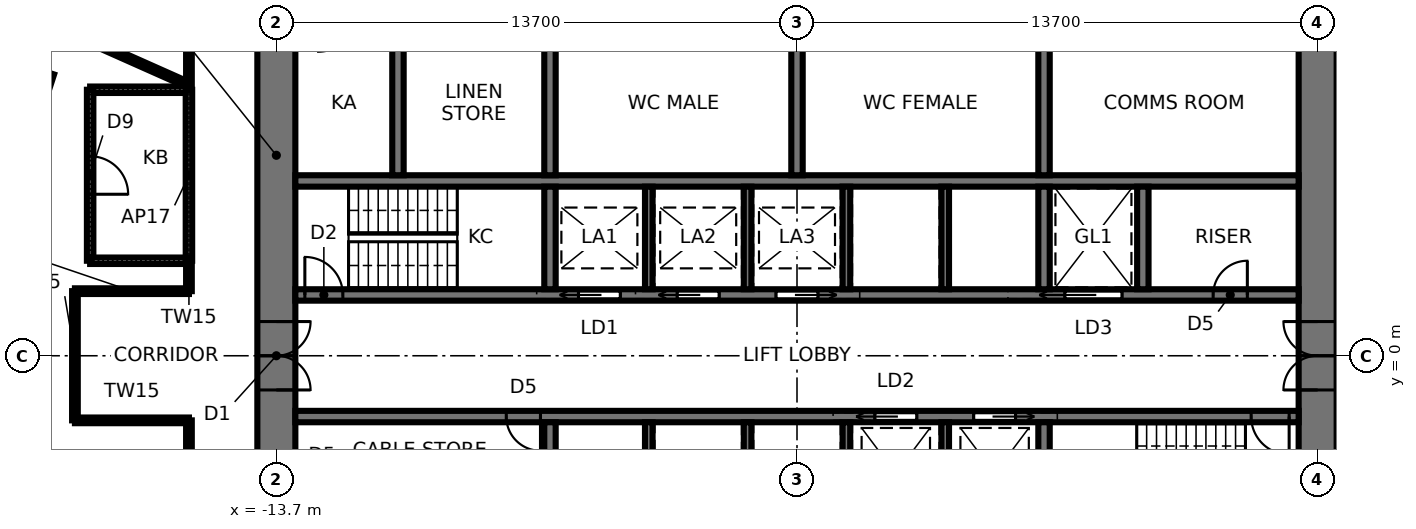
"""IFC4 building model, lengths in metres.
Left out: names, types, materials, properties, quantities, classifications, styles, units other than length and angle.
Written with IfcOpenShell. Run it as: python <this file> out.ifc"""

import sys

from ifc_helpers import new_model, si_unit, direction, frame, frame_2d, origin, origin_2d, place, context, subcontext, project, spatial, rectangle, extrude, element, fill, save


model = new_model("IFC4")
c1 = context("Model", 3, precision=1e-05, world=origin(), true_north=direction((0.0, 1.0)))
c2 = subcontext(c1, "Body", "Model", "MODEL_VIEW")
j1 = project(units=[si_unit("LENGTHUNIT", "METRE"), si_unit("PLANEANGLEUNIT", "RADIAN")], contexts=[c1])
p1 = place(None, origin())
s1 = spatial("IfcSite", under=j1, at=p1, CompositionType="ELEMENT")
p2 = place(p1, origin())
s2 = spatial("IfcBuilding", under=s1, at=p2, CompositionType="ELEMENT")
p3 = place(p2, frame((0.0, 0.0, 32.2)))
s3 = spatial("IfcBuildingStorey", under=s2, at=p3, CompositionType="ELEMENT", Elevation=32.2)
p4 = place(p3, frame((-20.808, 6.761, 0.0), z_axis=(0.0, 0.0, 1.0), x_axis=(-0.951056516295, 0.309016994375, 0.0)))
e1 = element("IfcColumn", 1, at=p4, inside=s3, PredefinedType="COLUMN", context=c2, shape_type="SweptSolid", body=[
    extrude(rectangle(XDim=2.0, YDim=2.0, at=origin_2d()), origin(), (0.0, 0.0, 1.0), 4.2),
])
p5 = place(p3, frame((13.7, -9.5, 0.0), z_axis=(0.0, 0.0, 1.0), x_axis=(0.0, 1.0, 0.0)))
e2 = element("IfcWall", 2, at=p5, inside=s3, PredefinedType="SHEAR", context=c2, shape_type="SweptSolid", body=[
    extrude(rectangle(XDim=19.0, YDim=1.0, at=frame_2d((9.5, 0.0))), origin(), (0.0, 0.0, 1.0), 4.2),
])
p6 = place(p5, frame((8.6, 0.0, 0.0)))
e3 = element("IfcOpeningElement", 3, at=p6, cuts=e2, PredefinedType="OPENING", context=c2, shape_type="SweptSolid", body=[
    extrude(rectangle(XDim=1.8, YDim=2.4, at=frame_2d((0.9, 1.2))), frame((0.0, 0.51, 0.0), z_axis=(0.0, -1.0, 0.0), x_axis=(1.0, 0.0, 0.0)), (0.0, 0.0, 1.0), 1.02),
])
p7 = place(p3, frame((-13.7, 9.5, 0.0), z_axis=(0.0, 0.0, 1.0), x_axis=(0.0, -1.0, 0.0)))
e4 = element("IfcWall", 4, at=p7, inside=s3, PredefinedType="SHEAR", context=c2, shape_type="SweptSolid", body=[
    extrude(rectangle(XDim=19.0, YDim=1.0, at=frame_2d((9.5, 0.0))), origin(), (0.0, 0.0, 1.0), 4.2),
])
p8 = place(p7, frame((8.6, 0.0, 0.0)))
e5 = element("IfcOpeningElement", 5, at=p8, cuts=e4, PredefinedType="OPENING", context=c2, shape_type="SweptSolid", body=[
    extrude(rectangle(XDim=1.8, YDim=2.4, at=frame_2d((0.9, 1.2))), frame((0.0, 0.51, 0.0), z_axis=(0.0, -1.0, 0.0), x_axis=(1.0, 0.0, 0.0)), (0.0, 0.0, 1.0), 1.02),
])
p9 = place(p3, frame((-13.2, 1.6, 0.0), z_axis=(0.0, 0.0, 1.0), x_axis=(1.0, 0.0, 0.0)))
e6 = element("IfcWall", 6, at=p9, inside=s3, PredefinedType="SHEAR", context=c2, shape_type="SweptSolid", body=[
    extrude(rectangle(XDim=26.4, YDim=0.3, at=frame_2d((13.2, 0.0))), origin(), (0.0, 0.0, 1.0), 4.2),
])
p10 = place(p9, frame((0.25, 0.0, 0.0)))
e7 = element("IfcOpeningElement", 7, at=p10, cuts=e6, PredefinedType="OPENING", context=c2, shape_type="SweptSolid", body=[
    extrude(rectangle(XDim=1.0, YDim=2.1, at=frame_2d((0.5, 1.05))), frame((0.0, 0.16, 0.0), z_axis=(0.0, -1.0, 0.0), x_axis=(1.0, 0.0, 0.0)), (0.0, 0.0, 1.0), 0.32),
])
p11 = place(p9, frame((20.25, 0.0, 0.0)))
e8 = element("IfcOpeningElement", 8, at=p11, cuts=e6, PredefinedType="OPENING", context=c2, shape_type="SweptSolid", body=[
    extrude(rectangle(XDim=1.5, YDim=2.4, at=frame_2d((0.75, 1.2))), frame((0.0, 0.16, 0.0), z_axis=(0.0, -1.0, 0.0), x_axis=(1.0, 0.0, 0.0)), (0.0, 0.0, 1.0), 0.32),
])
p12 = place(p9, frame((7.45, 0.0, 0.0)))
e9 = element("IfcOpeningElement", 9, at=p12, cuts=e6, PredefinedType="OPENING", context=c2, shape_type="SweptSolid", body=[
    extrude(rectangle(XDim=1.1, YDim=2.3, at=frame_2d((0.55, 1.15))), frame((0.0, 0.16, 0.0), z_axis=(0.0, -1.0, 0.0), x_axis=(1.0, 0.0, 0.0)), (0.0, 0.0, 1.0), 0.32),
])
p13 = place(p9, frame((10.05, 0.0, 0.0)))
e10 = element("IfcOpeningElement", 10, at=p13, cuts=e6, PredefinedType="OPENING", context=c2, shape_type="SweptSolid", body=[
    extrude(rectangle(XDim=1.1, YDim=2.3, at=frame_2d((0.55, 1.15))), frame((0.0, 0.16, 0.0), z_axis=(0.0, -1.0, 0.0), x_axis=(1.0, 0.0, 0.0)), (0.0, 0.0, 1.0), 0.32),
])
p14 = place(p9, frame((12.65, 0.0, 0.0)))
e11 = element("IfcOpeningElement", 11, at=p14, cuts=e6, PredefinedType="OPENING", context=c2, shape_type="SweptSolid", body=[
    extrude(rectangle(XDim=1.1, YDim=2.3, at=frame_2d((0.55, 1.15))), frame((0.0, 0.16, 0.0), z_axis=(0.0, -1.0, 0.0), x_axis=(1.0, 0.0, 0.0)), (0.0, 0.0, 1.0), 0.32),
])
p15 = place(p9, frame((24.15, 0.0, 0.0)))
e12 = element("IfcOpeningElement", 12, at=p15, cuts=e6, PredefinedType="OPENING", context=c2, shape_type="SweptSolid", body=[
    extrude(rectangle(XDim=0.9, YDim=2.1, at=frame_2d((0.45, 1.05))), frame((0.0, 0.16, 0.0), z_axis=(0.0, -1.0, 0.0), x_axis=(1.0, 0.0, 0.0)), (0.0, 0.0, 1.0), 0.32),
])
p16 = place(p3, frame((-13.2, -1.6, 0.0), z_axis=(0.0, 0.0, 1.0), x_axis=(1.0, 0.0, 0.0)))
e13 = element("IfcWall", 13, at=p16, inside=s3, PredefinedType="SHEAR", context=c2, shape_type="SweptSolid", body=[
    extrude(rectangle(XDim=26.4, YDim=0.3, at=frame_2d((13.2, 0.0))), origin(), (0.0, 0.0, 1.0), 4.2),
])
p17 = place(p16, frame((25.15, 0.0, 0.0)))
e14 = element("IfcOpeningElement", 14, at=p17, cuts=e13, PredefinedType="OPENING", context=c2, shape_type="SweptSolid", body=[
    extrude(rectangle(XDim=1.0, YDim=2.1, at=frame_2d((0.5, 1.05))), frame((0.0, 0.16, 0.0), z_axis=(0.0, -1.0, 0.0), x_axis=(1.0, 0.0, 0.0)), (0.0, 0.0, 1.0), 0.32),
])
p18 = place(p16, frame((15.25, 0.0, 0.0)))
e15 = element("IfcOpeningElement", 15, at=p18, cuts=e13, PredefinedType="OPENING", context=c2, shape_type="SweptSolid", body=[
    extrude(rectangle(XDim=1.1, YDim=2.3, at=frame_2d((0.55, 1.15))), frame((0.0, 0.16, 0.0), z_axis=(0.0, -1.0, 0.0), x_axis=(1.0, 0.0, 0.0)), (0.0, 0.0, 1.0), 0.32),
])
p19 = place(p16, frame((17.85, 0.0, 0.0)))
e16 = element("IfcOpeningElement", 16, at=p19, cuts=e13, PredefinedType="OPENING", context=c2, shape_type="SweptSolid", body=[
    extrude(rectangle(XDim=1.1, YDim=2.3, at=frame_2d((0.55, 1.15))), frame((0.0, 0.16, 0.0), z_axis=(0.0, -1.0, 0.0), x_axis=(1.0, 0.0, 0.0)), (0.0, 0.0, 1.0), 0.32),
])
p20 = place(p16, frame((5.55, 0.0, 0.0)))
e17 = element("IfcOpeningElement", 17, at=p20, cuts=e13, PredefinedType="OPENING", context=c2, shape_type="SweptSolid", body=[
    extrude(rectangle(XDim=0.9, YDim=2.1, at=frame_2d((0.45, 1.05))), frame((0.0, 0.16, 0.0), z_axis=(0.0, -1.0, 0.0), x_axis=(1.0, 0.0, 0.0)), (0.0, 0.0, 1.0), 0.32),
])
p21 = place(p3, frame((-13.2, 4.6, 0.0), z_axis=(0.0, 0.0, 1.0), x_axis=(1.0, 0.0, 0.0)))
e18 = element("IfcWall", 18, at=p21, inside=s3, PredefinedType="SHEAR", context=c2, shape_type="SweptSolid", body=[
    extrude(rectangle(XDim=26.4, YDim=0.3, at=frame_2d((13.2, 0.0))), origin(), (0.0, 0.0, 1.0), 4.2),
])
p22 = place(p3, frame((-6.5, 1.75, 0.0), z_axis=(0.0, 0.0, 1.0), x_axis=(0.0, 1.0, 0.0)))
e19 = element("IfcWall", 19, at=p22, inside=s3, PredefinedType="SHEAR", context=c2, shape_type="SweptSolid", body=[
    extrude(rectangle(XDim=2.7, YDim=0.3, at=frame_2d((1.35, 0.0))), origin(), (0.0, 0.0, 1.0), 4.2),
])
p23 = place(p3, frame((-6.5, 4.75, 0.0), z_axis=(0.0, 0.0, 1.0), x_axis=(0.0, 1.0, 0.0)))
e20 = element("IfcWall", 20, at=p23, inside=s3, PredefinedType="SHEAR", context=c2, shape_type="SweptSolid", body=[
    extrude(rectangle(XDim=3.75, YDim=0.3, at=frame_2d((1.875, 0.0))), origin(), (0.0, 0.0, 1.0), 4.2),
])
p24 = place(p3, frame((6.5, 1.75, 0.0), z_axis=(0.0, 0.0, 1.0), x_axis=(0.0, 1.0, 0.0)))
e21 = element("IfcWall", 21, at=p24, inside=s3, PredefinedType="SHEAR", context=c2, shape_type="SweptSolid", body=[
    extrude(rectangle(XDim=2.7, YDim=0.3, at=frame_2d((1.35, 0.0))), origin(), (0.0, 0.0, 1.0), 4.2),
])
p25 = place(p3, frame((6.5, 4.75, 0.0), z_axis=(0.0, 0.0, 1.0), x_axis=(0.0, 1.0, 0.0)))
e22 = element("IfcWall", 22, at=p25, inside=s3, PredefinedType="SHEAR", context=c2, shape_type="SweptSolid", body=[
    extrude(rectangle(XDim=3.75, YDim=0.3, at=frame_2d((1.875, 0.0))), origin(), (0.0, 0.0, 1.0), 4.2),
])
for number, where, z_axis, x_axis in (
    (23, (-3.9, 1.75, 0.0), (0.0, 0.0, 1.0), (0.0, 1.0, 0.0)),
    (24, (-1.3, 1.75, 0.0), (0.0, 0.0, 1.0), (0.0, 1.0, 0.0)),
    (25, (1.3, 1.75, 0.0), (0.0, 0.0, 1.0), (0.0, 1.0, 0.0)),
    (26, (3.9, 1.75, 0.0), (0.0, 0.0, 1.0), (0.0, 1.0, 0.0)),
):
    element("IfcWall", number, at=place(p3, frame(where, z_axis=z_axis, x_axis=x_axis)), inside=s3, PredefinedType="SHEAR", context=c2, shape_type="SweptSolid", body=[
        extrude(rectangle(XDim=2.7, YDim=0.2, at=frame_2d((1.35, 0.0))), origin(), (0.0, 0.0, 1.0), 4.2),
    ])
p26 = place(p3, frame((0.0, 4.75, 0.0), z_axis=(0.0, 0.0, 1.0), x_axis=(0.0, 1.0, 0.0)))
e27 = element("IfcWall", 27, at=p26, inside=s3, PredefinedType="SHEAR", context=c2, shape_type="SweptSolid", body=[
    extrude(rectangle(XDim=3.75, YDim=0.3, at=frame_2d((1.875, 0.0))), origin(), (0.0, 0.0, 1.0), 4.2),
])
for number, where, z_axis, x_axis in (
    (28, (-6.5, -1.75, 0.0), (0.0, 0.0, 1.0), (0.0, -1.0, 0.0)),
    (29, (6.5, -1.75, 0.0), (0.0, 0.0, 1.0), (0.0, -1.0, 0.0)),
):
    element("IfcWall", number, at=place(p3, frame(where, z_axis=z_axis, x_axis=x_axis)), inside=s3, PredefinedType="SHEAR", context=c2, shape_type="SweptSolid", body=[
        extrude(rectangle(XDim=2.7, YDim=0.3, at=frame_2d((1.35, 0.0))), origin(), (0.0, 0.0, 1.0), 4.2),
    ])
for number, where, z_axis, x_axis in (
    (30, (-3.9, -1.75, 0.0), (0.0, 0.0, 1.0), (0.0, -1.0, 0.0)),
    (31, (-1.3, -1.75, 0.0), (0.0, 0.0, 1.0), (0.0, -1.0, 0.0)),
    (32, (1.3, -1.75, 0.0), (0.0, 0.0, 1.0), (0.0, -1.0, 0.0)),
    (33, (3.9, -1.75, 0.0), (0.0, 0.0, 1.0), (0.0, -1.0, 0.0)),
):
    element("IfcWall", number, at=place(p3, frame(where, z_axis=z_axis, x_axis=x_axis)), inside=s3, PredefinedType="SHEAR", context=c2, shape_type="SweptSolid", body=[
        extrude(rectangle(XDim=2.7, YDim=0.2, at=frame_2d((1.35, 0.0))), origin(), (0.0, 0.0, 1.0), 4.2),
    ])
p27 = place(p3, frame((-10.5, 4.75, 0.0), z_axis=(0.0, 0.0, 1.0), x_axis=(0.0, 1.0, 0.0)))
e34 = element("IfcWall", 34, at=p27, inside=s3, PredefinedType="SHEAR", context=c2, shape_type="SweptSolid", body=[
    extrude(rectangle(XDim=3.75, YDim=0.3, at=frame_2d((1.875, 0.0))), origin(), (0.0, 0.0, 1.0), 4.2),
])
p28 = place(p3, frame((9.1, 1.75, 0.0), z_axis=(0.0, 0.0, 1.0), x_axis=(0.0, 1.0, 0.0)))
e35 = element("IfcWall", 35, at=p28, inside=s3, PredefinedType="SHEAR", context=c2, shape_type="SweptSolid", body=[
    extrude(rectangle(XDim=2.7, YDim=0.3, at=frame_2d((1.35, 0.0))), origin(), (0.0, 0.0, 1.0), 4.2),
])
p29 = place(p3, frame((-19.0, -1.7, 0.0), z_axis=(0.0, 0.0, 1.0), x_axis=(1.0, 0.0, 0.0)))
e36 = element("IfcWall", 36, at=p29, inside=s3, PredefinedType="PARTITIONING", context=c2, shape_type="SweptSolid", body=[
    extrude(rectangle(XDim=3.0, YDim=0.15, at=frame_2d((1.5, 0.0))), origin(), (0.0, 0.0, 1.0), 4.04),
])
p30 = place(p3, frame((-16.0, -1.7, 0.0), z_axis=(0.0, 0.0, 1.0), x_axis=(0.0, -1.0, 0.0)))
e37 = element("IfcWall", 37, at=p30, inside=s3, PredefinedType="PARTITIONING", context=c2, shape_type="SweptSolid", body=[
    extrude(rectangle(XDim=9.6, YDim=0.15, at=frame_2d((4.8, 0.0))), origin(), (0.0, 0.0, 1.0), 4.04),
])
p31 = place(p30, frame((3.8, 0.0, 0.0)))
e38 = element("IfcOpeningElement", 38, at=p31, cuts=e37, PredefinedType="OPENING", context=c2, shape_type="SweptSolid", body=[
    extrude(rectangle(XDim=2.0, YDim=2.4, at=frame_2d((1.0, 1.2))), frame((0.0, 0.085, 0.0), z_axis=(0.0, -1.0, 0.0), x_axis=(1.0, 0.0, 0.0)), (0.0, 0.0, 1.0), 0.17),
])
p32 = place(p3, frame((-16.0, 11.3, 0.0), z_axis=(0.0, 0.0, 1.0), x_axis=(0.0, -1.0, 0.0)))
e39 = element("IfcWall", 39, at=p32, inside=s3, PredefinedType="PARTITIONING", context=c2, shape_type="SweptSolid", body=[
    extrude(rectangle(XDim=4.3, YDim=0.15, at=frame_2d((2.15, 0.0))), origin(), (0.0, 0.0, 1.0), 4.04),
])
p33 = place(p3, frame((-16.0, 7.124, 0.0), z_axis=(0.0, 0.0, 1.0), x_axis=(-0.913550959064, 0.406724286457, 0.0)))
e40 = element("IfcWall", 40, at=p33, inside=s3, PredefinedType="PARTITIONING", context=c2, shape_type="SweptSolid", body=[
    extrude(rectangle(XDim=8.892, YDim=0.15, at=frame_2d((4.446, 0.0))), origin(), (0.0, 0.0, 1.0), 4.04),
])
p34 = place(p3, frame((-16.0, 7.0, 0.0), z_axis=(0.0, 0.0, 1.0), x_axis=(-1.0, 0.0, 0.0)))
e41 = element("IfcWall", 41, at=p34, inside=s3, PredefinedType="PARTITIONING", context=c2, shape_type="SweptSolid", body=[
    extrude(rectangle(XDim=2.6, YDim=0.17, at=frame_2d((1.3, 0.0))), origin(), (0.0, 0.0, 1.0), 4.04),
])
p35 = place(p3, frame((-16.0, 2.5, 0.0), z_axis=(0.0, 0.0, 1.0), x_axis=(0.0, 1.0, 0.0)))
e42 = element("IfcWall", 42, at=p35, inside=s3, PredefinedType="PARTITIONING", context=c2, shape_type="SweptSolid", body=[
    extrude(rectangle(XDim=4.5, YDim=0.17, at=frame_2d((2.25, 0.0))), origin(), (0.0, 0.0, 1.0), 4.04),
])
p36 = place(p3, frame((-18.6, 7.0, 0.0), z_axis=(0.0, 0.0, 1.0), x_axis=(0.0, -1.0, 0.0)))
e43 = element("IfcWall", 43, at=p36, inside=s3, PredefinedType="PARTITIONING", context=c2, shape_type="SweptSolid", body=[
    extrude(rectangle(XDim=4.5, YDim=0.17, at=frame_2d((2.25, 0.0))), origin(), (0.0, 0.0, 1.0), 3.586),
])
p37 = place(p36, frame((1.75, 0.0, 0.0)))
e44 = element("IfcOpeningElement", 44, at=p37, cuts=e43, PredefinedType="OPENING", context=c2, shape_type="SweptSolid", body=[
    extrude(rectangle(XDim=1.0, YDim=2.4, at=frame_2d((0.5, 1.2))), frame((0.0, 0.095, 0.0), z_axis=(0.0, -1.0, 0.0), x_axis=(1.0, 0.0, 0.0)), (0.0, 0.0, 1.0), 0.19),
])
p38 = place(p3, frame((-18.6, 2.5, 0.0), z_axis=(0.0, 0.0, 1.0), x_axis=(1.0, 0.0, 0.0)))
e45 = element("IfcWall", 45, at=p38, inside=s3, PredefinedType="PARTITIONING", context=c2, shape_type="SweptSolid", body=[
    extrude(rectangle(XDim=2.6, YDim=0.17, at=frame_2d((1.3, 0.0))), origin(), (0.0, 0.0, 1.0), 4.04),
])
p39 = place(p3, frame((-16.0, 2.5, 0.0), z_axis=(0.0, 0.0, 1.0), x_axis=(0.0, -1.0, 0.0)))
e46 = element("IfcWall", 46, at=p39, inside=s3, PredefinedType="PARTITIONING", context=c2, shape_type="SweptSolid", body=[
    extrude(rectangle(XDim=0.8, YDim=0.15, at=frame_2d((0.4, 0.0))), origin(), (0.0, 0.0, 1.0), 4.04),
])
p40 = place(p3, frame((-16.0, 1.7, 0.0), z_axis=(0.0, 0.0, 1.0), x_axis=(-1.0, 0.0, 0.0)))
e47 = element("IfcWall", 47, at=p40, inside=s3, PredefinedType="PARTITIONING", context=c2, shape_type="SweptSolid", body=[
    extrude(rectangle(XDim=3.0, YDim=0.15, at=frame_2d((1.5, 0.0))), origin(), (0.0, 0.0, 1.0), 4.04),
])
p41 = place(p3, frame((-19.0, 1.7, 0.0), z_axis=(0.0, 0.0, 1.0), x_axis=(0.0, -1.0, 0.0)))
e48 = element("IfcWall", 48, at=p41, inside=s3, PredefinedType="PARTITIONING", context=c2, shape_type="SweptSolid", body=[
    extrude(rectangle(XDim=3.4, YDim=0.15, at=frame_2d((1.7, 0.0))), origin(), (0.0, 0.0, 1.0), 3.586),
])
p42 = place(p8, origin())
e49 = element("IfcDoor", 49, at=p42, inside=s3, OperationType="DOUBLE_DOOR_SINGLE_SWING", PredefinedType="DOOR", context=c2, shape_type="SweptSolid", body=[
    extrude(rectangle(XDim=1.72, YDim=2.36, at=frame_2d((0.9, 1.18))), frame((0.0, 0.025, 0.0), z_axis=(0.0, -1.0, 0.0), x_axis=(1.0, 0.0, 0.0)), (0.0, 0.0, 1.0), 0.05),
    extrude(rectangle(XDim=0.04, YDim=2.4, at=frame_2d((0.02, 1.2))), frame((0.0, 0.25, 0.0), z_axis=(0.0, -1.0, 0.0), x_axis=(1.0, 0.0, 0.0)), (0.0, 0.0, 1.0), 0.5),
    extrude(rectangle(XDim=0.04, YDim=2.4, at=frame_2d((1.78, 1.2))), frame((0.0, 0.25, 0.0), z_axis=(0.0, -1.0, 0.0), x_axis=(1.0, 0.0, 0.0)), (0.0, 0.0, 1.0), 0.5),
    extrude(rectangle(XDim=1.72, YDim=0.04, at=frame_2d((0.9, 2.38))), frame((0.0, 0.25, 0.0), z_axis=(0.0, -1.0, 0.0), x_axis=(1.0, 0.0, 0.0)), (0.0, 0.0, 1.0), 0.5),
])
fill(e5, e49)
p43 = place(p6, origin())
e50 = element("IfcDoor", 50, at=p43, inside=s3, OperationType="DOUBLE_DOOR_SINGLE_SWING", PredefinedType="DOOR", context=c2, shape_type="SweptSolid", body=[
    extrude(rectangle(XDim=1.72, YDim=2.36, at=frame_2d((0.9, 1.18))), frame((0.0, 0.025, 0.0), z_axis=(0.0, -1.0, 0.0), x_axis=(1.0, 0.0, 0.0)), (0.0, 0.0, 1.0), 0.05),
    extrude(rectangle(XDim=0.04, YDim=2.4, at=frame_2d((0.02, 1.2))), frame((0.0, 0.25, 0.0), z_axis=(0.0, -1.0, 0.0), x_axis=(1.0, 0.0, 0.0)), (0.0, 0.0, 1.0), 0.5),
    extrude(rectangle(XDim=0.04, YDim=2.4, at=frame_2d((1.78, 1.2))), frame((0.0, 0.25, 0.0), z_axis=(0.0, -1.0, 0.0), x_axis=(1.0, 0.0, 0.0)), (0.0, 0.0, 1.0), 0.5),
    extrude(rectangle(XDim=1.72, YDim=0.04, at=frame_2d((0.9, 2.38))), frame((0.0, 0.25, 0.0), z_axis=(0.0, -1.0, 0.0), x_axis=(1.0, 0.0, 0.0)), (0.0, 0.0, 1.0), 0.5),
])
fill(e3, e50)
p44 = place(p10, origin())
e51 = element("IfcDoor", 51, at=p44, inside=s3, OperationType="SINGLE_SWING_LEFT", PredefinedType="DOOR", context=c2, shape_type="SweptSolid", body=[
    extrude(rectangle(XDim=1.0, YDim=2.1, at=frame_2d((0.5, 1.05))), frame((0.0, 0.025, 0.0), z_axis=(0.0, -1.0, 0.0), x_axis=(1.0, 0.0, 0.0)), (0.0, 0.0, 1.0), 0.05),
])
fill(e7, e51)
p45 = place(p17, frame((1.0, 0.0, 0.0), z_axis=(0.0, 0.0, 1.0), x_axis=(-1.0, 0.0, 0.0)))
e52 = element("IfcDoor", 52, at=p45, inside=s3, OperationType="SINGLE_SWING_LEFT", PredefinedType="DOOR", context=c2, shape_type="SweptSolid", body=[
    extrude(rectangle(XDim=1.0, YDim=2.1, at=frame_2d((0.5, 1.05))), frame((0.0, 0.025, 0.0), z_axis=(0.0, -1.0, 0.0), x_axis=(1.0, 0.0, 0.0)), (0.0, 0.0, 1.0), 0.05),
])
fill(e14, e52)
p46 = place(p11, origin())
e53 = element("IfcDoor", 53, at=p46, inside=s3, OperationType="SLIDING_TO_LEFT", PredefinedType="DOOR", context=c2, shape_type="SweptSolid", body=[
    extrude(rectangle(XDim=1.5, YDim=2.4, at=frame_2d((0.75, 1.2))), frame((0.0, 0.025, 0.0), z_axis=(0.0, -1.0, 0.0), x_axis=(1.0, 0.0, 0.0)), (0.0, 0.0, 1.0), 0.05),
])
fill(e8, e53)
p47 = place(p12, origin())
e54 = element("IfcDoor", 54, at=p47, inside=s3, OperationType="SLIDING_TO_LEFT", PredefinedType="DOOR", context=c2, shape_type="SweptSolid", body=[
    extrude(rectangle(XDim=1.1, YDim=2.3, at=frame_2d((0.55, 1.15))), frame((0.0, 0.025, 0.0), z_axis=(0.0, -1.0, 0.0), x_axis=(1.0, 0.0, 0.0)), (0.0, 0.0, 1.0), 0.05),
])
fill(e9, e54)
p48 = place(p13, origin())
e55 = element("IfcDoor", 55, at=p48, inside=s3, OperationType="SLIDING_TO_LEFT", PredefinedType="DOOR", context=c2, shape_type="SweptSolid", body=[
    extrude(rectangle(XDim=1.1, YDim=2.3, at=frame_2d((0.55, 1.15))), frame((0.0, 0.025, 0.0), z_axis=(0.0, -1.0, 0.0), x_axis=(1.0, 0.0, 0.0)), (0.0, 0.0, 1.0), 0.05),
])
fill(e10, e55)
p49 = place(p14, origin())
e56 = element("IfcDoor", 56, at=p49, inside=s3, OperationType="SLIDING_TO_RIGHT", PredefinedType="DOOR", context=c2, shape_type="SweptSolid", body=[
    extrude(rectangle(XDim=1.1, YDim=2.3, at=frame_2d((0.55, 1.15))), frame((0.0, 0.025, 0.0), z_axis=(0.0, -1.0, 0.0), x_axis=(1.0, 0.0, 0.0)), (0.0, 0.0, 1.0), 0.05),
])
fill(e11, e56)
p50 = place(p18, frame((1.1, 0.0, 0.0), z_axis=(0.0, 0.0, 1.0), x_axis=(-1.0, 0.0, 0.0)))
e57 = element("IfcDoor", 57, at=p50, inside=s3, OperationType="SLIDING_TO_RIGHT", PredefinedType="DOOR", context=c2, shape_type="SweptSolid", body=[
    extrude(rectangle(XDim=1.1, YDim=2.3, at=frame_2d((0.55, 1.15))), frame((0.0, 0.025, 0.0), z_axis=(0.0, -1.0, 0.0), x_axis=(1.0, 0.0, 0.0)), (0.0, 0.0, 1.0), 0.05),
])
fill(e15, e57)
p51 = place(p19, frame((1.1, 0.0, 0.0), z_axis=(0.0, 0.0, 1.0), x_axis=(-1.0, 0.0, 0.0)))
e58 = element("IfcDoor", 58, at=p51, inside=s3, OperationType="SLIDING_TO_LEFT", PredefinedType="DOOR", context=c2, shape_type="SweptSolid", body=[
    extrude(rectangle(XDim=1.1, YDim=2.3, at=frame_2d((0.55, 1.15))), frame((0.0, 0.025, 0.0), z_axis=(0.0, -1.0, 0.0), x_axis=(1.0, 0.0, 0.0)), (0.0, 0.0, 1.0), 0.05),
])
fill(e16, e58)
p52 = place(p15, origin())
e59 = element("IfcDoor", 59, at=p52, inside=s3, OperationType="SINGLE_SWING_RIGHT", PredefinedType="DOOR", context=c2, shape_type="SweptSolid", body=[
    extrude(rectangle(XDim=0.9, YDim=2.1, at=frame_2d((0.45, 1.05))), frame((0.0, 0.025, 0.0), z_axis=(0.0, -1.0, 0.0), x_axis=(1.0, 0.0, 0.0)), (0.0, 0.0, 1.0), 0.05),
])
fill(e12, e59)
p53 = place(p20, frame((0.9, 0.0, 0.0), z_axis=(0.0, 0.0, 1.0), x_axis=(-1.0, 0.0, 0.0)))
e60 = element("IfcDoor", 60, at=p53, inside=s3, OperationType="SINGLE_SWING_LEFT", PredefinedType="DOOR", context=c2, shape_type="SweptSolid", body=[
    extrude(rectangle(XDim=0.9, YDim=2.1, at=frame_2d((0.45, 1.05))), frame((0.0, 0.025, 0.0), z_axis=(0.0, -1.0, 0.0), x_axis=(1.0, 0.0, 0.0)), (0.0, 0.0, 1.0), 0.05),
])
fill(e17, e60)
p54 = place(p37, origin())
e61 = element("IfcDoor", 61, at=p54, inside=s3, OperationType="SINGLE_SWING_RIGHT", PredefinedType="DOOR", context=c2, shape_type="SweptSolid", body=[
    extrude(rectangle(XDim=1.0, YDim=2.4, at=frame_2d((0.5, 1.2))), frame((0.0, 0.025, 0.0), z_axis=(0.0, -1.0, 0.0), x_axis=(1.0, 0.0, 0.0)), (0.0, 0.0, 1.0), 0.05),
])
fill(e44, e61)
save(model, sys.argv[1])
